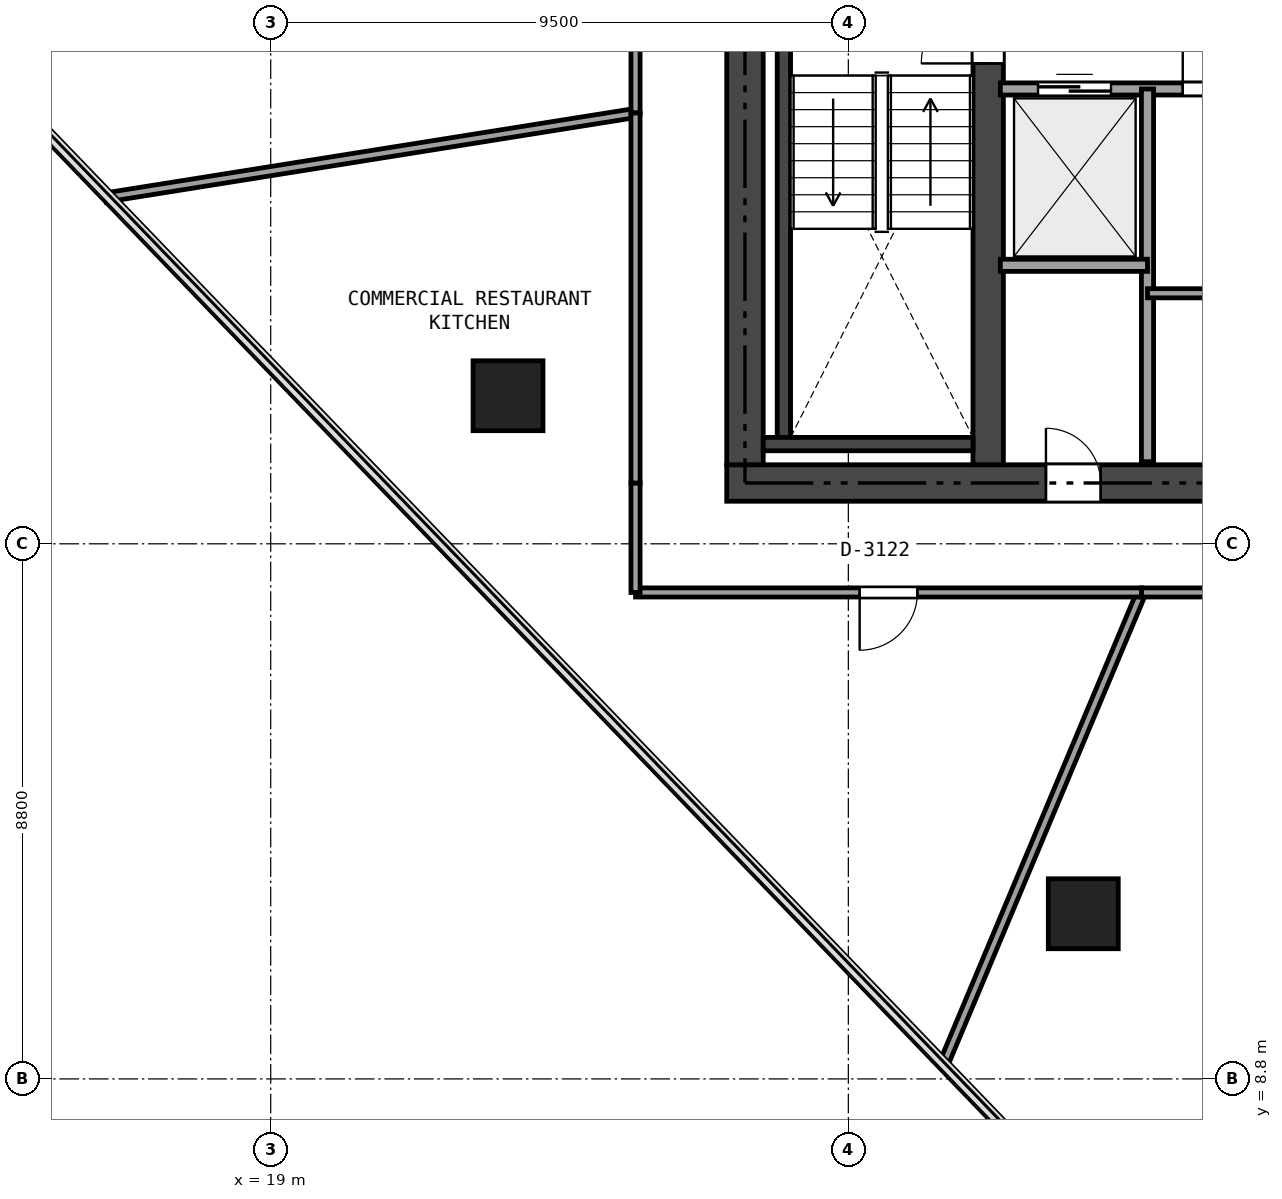
"""IFC4 building model, lengths in metres.
Left out: names, types, materials, properties, quantities, classifications, styles, units other than length and angle.
Written with IfcOpenShell. Run it as: python <this file> out.ifc"""

import sys

from ifc_helpers import new_model, si_unit, direction, frame, frame_2d, origin, origin_2d, place, context, subcontext, project, spatial, rectangle, extrude, element, fill, save


model = new_model("IFC4")
c1 = context("Model", 3, precision=1e-05, world=origin(), true_north=direction((0.0, 1.0)))
c2 = subcontext(c1, "Body", "Model", "MODEL_VIEW")
j1 = project(units=[si_unit("LENGTHUNIT", "METRE"), si_unit("PLANEANGLEUNIT", "RADIAN")], contexts=[c1])
p1 = place(None, origin())
s1 = spatial("IfcSite", under=j1, at=p1, CompositionType="ELEMENT")
p2 = place(p1, origin())
s2 = spatial("IfcBuilding", under=s1, at=p2, CompositionType="ELEMENT")
p3 = place(p2, frame((0.0, 0.0, 117.75)))
s3 = spatial("IfcBuildingStorey", under=s2, at=p3, CompositionType="ELEMENT", Elevation=117.75)
p4 = place(p3, frame((26.5, 18.6, 0.0), z_axis=(0.0, 0.0, 1.0), x_axis=(1.0, 0.0, 0.0)))
e1 = element("IfcWall", 1, at=p4, inside=s3, PredefinedType="SHEAR", context=c2, shape_type="SweptSolid", body=[
    extrude(rectangle(XDim=21.4, YDim=0.6, at=frame_2d((10.7, 0.0))), origin(), (0.0, 0.0, 1.0), 3.09),
])
p5 = place(p4, frame((12.425, 0.0, 0.0)))
e2 = element("IfcOpeningElement", 2, at=p5, cuts=e1, PredefinedType="OPENING", context=c2, shape_type="SweptSolid", body=[
    extrude(rectangle(XDim=1.15, YDim=2.15, at=frame_2d((0.575, 1.075))), frame((0.0, 0.31, 0.0), z_axis=(0.0, -1.0, 0.0), x_axis=(1.0, 0.0, 0.0)), (0.0, 0.0, 1.0), 0.62),
])
p6 = place(p4, frame((5.25, 0.0, 0.0)))
e3 = element("IfcOpeningElement", 3, at=p6, cuts=e1, PredefinedType="OPENING", context=c2, shape_type="SweptSolid", body=[
    extrude(rectangle(XDim=0.9, YDim=2.1, at=frame_2d((0.45, 1.05))), frame((0.0, 0.31, 0.0), z_axis=(0.0, -1.0, 0.0), x_axis=(1.0, 0.0, 0.0)), (0.0, 0.0, 1.0), 0.62),
])
p7 = place(p3, frame((26.8, 18.9, 0.0), z_axis=(0.0, 0.0, 1.0), x_axis=(0.0, 1.0, 0.0)))
e4 = element("IfcWall", 4, at=p7, inside=s3, PredefinedType="SHEAR", context=c2, shape_type="SweptSolid", body=[
    extrude(rectangle(XDim=15.0, YDim=0.6, at=frame_2d((7.5, 0.0))), origin(), (0.0, 0.0, 1.0), 3.09),
])
p8 = place(p3, frame((30.8, 18.9, 0.0), z_axis=(0.0, 0.0, 1.0), x_axis=(0.0, 1.0, 0.0)))
e5 = element("IfcWall", 5, at=p8, inside=s3, PredefinedType="SHEAR", context=c2, shape_type="SweptSolid", body=[
    extrude(rectangle(XDim=15.0, YDim=0.5, at=frame_2d((7.5, 0.0))), origin(), (0.0, 0.0, 1.0), 3.09),
])
p9 = place(p8, frame((6.6, 0.0, 0.0)))
e6 = element("IfcOpeningElement", 6, at=p9, cuts=e5, PredefinedType="OPENING", context=c2, shape_type="SweptSolid", body=[
    extrude(rectangle(XDim=1.1, YDim=2.15, at=frame_2d((0.55, 1.075))), frame((0.0, 0.26, 0.0), z_axis=(0.0, -1.0, 0.0), x_axis=(1.0, 0.0, 0.0)), (0.0, 0.0, 1.0), 0.52),
])
p10 = place(p8, frame((8.4, 0.0, 0.0)))
e7 = element("IfcOpeningElement", 7, at=p10, cuts=e5, PredefinedType="OPENING", context=c2, shape_type="SweptSolid", body=[
    extrude(rectangle(XDim=0.9, YDim=2.1, at=frame_2d((0.45, 1.05))), frame((0.0, 0.26, 0.0), z_axis=(0.0, -1.0, 0.0), x_axis=(1.0, 0.0, 0.0)), (0.0, 0.0, 1.0), 0.52),
])
p11 = place(p3, frame((27.44, 19.35, 0.0), z_axis=(0.0, 0.0, 1.0), x_axis=(0.0, 1.0, 0.0)))
e8 = element("IfcWall", 8, at=p11, inside=s3, PredefinedType="SHEAR", context=c2, shape_type="SweptSolid", body=[
    extrude(rectangle(XDim=7.4, YDim=0.22, at=frame_2d((3.7, 0.0))), origin(), (0.0, 0.0, 1.0), 3.09),
])
p12 = place(p3, frame((27.1, 19.24, 0.0), z_axis=(0.0, 0.0, 1.0), x_axis=(1.0, 0.0, 0.0)))
e9 = element("IfcWall", 9, at=p12, inside=s3, PredefinedType="SHEAR", context=c2, shape_type="SweptSolid", body=[
    extrude(rectangle(XDim=3.45, YDim=0.22, at=frame_2d((1.725, 0.0))), origin(), (0.0, 0.0, 1.0), 3.09),
])
for number, where, z_axis, x_axis in (
    (10, (22.903, 20.035, 0.0), (0.0, 0.0, 1.0), (1.0, 0.0, 0.0)),
    (11, (32.364, 11.516, 0.0), (0.0, 0.0, 1.0), (1.0, 0.0, 0.0)),
):
    element("IfcColumn", number, at=place(p3, frame(where, z_axis=z_axis, x_axis=x_axis)), inside=s3, PredefinedType="COLUMN", context=c2, shape_type="SweptSolid", body=[
        extrude(rectangle(XDim=1.15, YDim=1.15, at=origin_2d()), origin(), (0.0, 0.0, 1.0), 3.09),
    ])
p13 = place(p3, frame((31.0, 25.08, 0.0), z_axis=(0.0, 0.0, 1.0), x_axis=(1.0, 0.0, 0.0)))
e12 = element("IfcWall", 12, at=p13, inside=s3, PredefinedType="SOLIDWALL", context=c2, shape_type="SweptSolid", body=[
    extrude(rectangle(XDim=4.42, YDim=0.2, at=frame_2d((2.21, 0.0))), origin(), (0.0, 0.0, 1.0), 3.09),
])
p14 = place(p13, frame((3.0, 0.0, 0.0)))
e13 = element("IfcOpeningElement", 13, at=p14, cuts=e12, PredefinedType="OPENING", context=c2, shape_type="SweptSolid", body=[
    extrude(rectangle(XDim=0.9, YDim=2.1, at=frame_2d((0.45, 1.05))), frame((0.0, 0.11, 0.0), z_axis=(0.0, -1.0, 0.0), x_axis=(1.0, 0.0, 0.0)), (0.0, 0.0, 1.0), 0.22),
])
p15 = place(p13, frame((0.62, 0.0, 0.0)))
e14 = element("IfcOpeningElement", 14, at=p15, cuts=e12, PredefinedType="OPENING", context=c2, shape_type="SweptSolid", body=[
    extrude(rectangle(XDim=1.2, YDim=2.15, at=frame_2d((0.6, 1.075))), frame((0.0, 0.11, 0.0), z_axis=(0.0, -1.0, 0.0), x_axis=(1.0, 0.0, 0.0)), (0.0, 0.0, 1.0), 0.22),
])
p16 = place(p3, frame((33.42, 18.95, 0.0), z_axis=(0.0, 0.0, 1.0), x_axis=(0.0, 1.0, 0.0)))
e15 = element("IfcWall", 15, at=p16, inside=s3, PredefinedType="SOLIDWALL", context=c2, shape_type="SweptSolid", body=[
    extrude(rectangle(XDim=6.13, YDim=0.2, at=frame_2d((3.065, 0.0))), origin(), (0.0, 0.0, 1.0), 2.611),
])
p17 = place(p3, frame((31.0, 22.18, 0.0), z_axis=(0.0, 0.0, 1.0), x_axis=(1.0, 0.0, 0.0)))
e16 = element("IfcWall", 16, at=p17, inside=s3, PredefinedType="SOLIDWALL", context=c2, shape_type="SweptSolid", body=[
    extrude(rectangle(XDim=2.42, YDim=0.2, at=frame_2d((1.21, 0.0))), origin(), (0.0, 0.0, 1.0), 3.09),
])
p18 = place(p3, frame((33.42, 21.72, 0.0), z_axis=(0.0, 0.0, 1.0), x_axis=(1.0, 0.0, 0.0)))
e17 = element("IfcWall", 17, at=p18, inside=s3, PredefinedType="PARTITIONING", context=c2, shape_type="SweptSolid", body=[
    extrude(rectangle(XDim=2.0, YDim=0.15, at=frame_2d((1.0, 0.0))), origin(), (0.0, 0.0, 1.0), 3.09),
])
p19 = place(p3, frame((16.281, 23.295, 0.0), z_axis=(0.0, 0.0, 1.0), x_axis=(0.987527105535, 0.157449089657, 0.0)))
e18 = element("IfcWall", 18, at=p19, inside=s3, PredefinedType="PARTITIONING", context=c2, shape_type="SweptSolid", body=[
    extrude(rectangle(XDim=8.829, YDim=0.15, at=frame_2d((4.415, 0.0))), origin(), (0.0, 0.0, 1.0), 2.375),
])
p20 = place(p3, frame((25.0, 24.685, 0.0), z_axis=(0.0, 0.0, 1.0), x_axis=(0.0, 1.0, 0.0)))
e19 = element("IfcWall", 19, at=p20, inside=s3, PredefinedType="PARTITIONING", context=c2, shape_type="SweptSolid", body=[
    extrude(rectangle(XDim=11.315, YDim=0.15, at=frame_2d((5.657, 0.0))), origin(), (0.0, 0.0, 1.0), 2.375),
])
p21 = place(p20, frame((5.183, 0.0, 0.0)))
e20 = element("IfcOpeningElement", 20, at=p21, cuts=e19, PredefinedType="OPENING", context=c2, shape_type="SweptSolid", body=[
    extrude(rectangle(XDim=0.95, YDim=2.15, at=frame_2d((0.475, 1.075))), frame((0.0, 0.085, 0.0), z_axis=(0.0, -1.0, 0.0), x_axis=(1.0, 0.0, 0.0)), (0.0, 0.0, 1.0), 0.17),
])
p22 = place(p3, frame((30.051, 9.008, 0.0), z_axis=(0.0, 0.0, 1.0), x_axis=(0.386969195842, 0.922092642563, 0.0)))
e21 = element("IfcWall", 21, at=p22, inside=s3, PredefinedType="PARTITIONING", context=c2, shape_type="SweptSolid", body=[
    extrude(rectangle(XDim=8.45, YDim=0.15, at=frame_2d((4.225, 0.0))), origin(), (0.0, 0.0, 1.0), 2.375),
])
p23 = place(p3, frame((33.321, 16.8, 0.0), z_axis=(0.0, 0.0, 1.0), x_axis=(-1.0, 0.0, 0.0)))
e22 = element("IfcWall", 22, at=p23, inside=s3, PredefinedType="PARTITIONING", context=c2, shape_type="SweptSolid", body=[
    extrude(rectangle(XDim=8.321, YDim=0.15, at=frame_2d((4.161, 0.0))), origin(), (0.0, 0.0, 1.0), 2.375),
])
p24 = place(p23, frame((3.685, 0.0, 0.0)))
e23 = element("IfcOpeningElement", 23, at=p24, cuts=e22, PredefinedType="OPENING", context=c2, shape_type="SweptSolid", body=[
    extrude(rectangle(XDim=0.95, YDim=2.15, at=frame_2d((0.475, 1.075))), frame((0.0, 0.085, 0.0), z_axis=(0.0, -1.0, 0.0), x_axis=(1.0, 0.0, 0.0)), (0.0, 0.0, 1.0), 0.17),
])
p25 = place(p3, frame((25.0, 16.8, 0.0), z_axis=(0.0, 0.0, 1.0), x_axis=(0.0, 1.0, 0.0)))
e24 = element("IfcWall", 24, at=p25, inside=s3, PredefinedType="PARTITIONING", context=c2, shape_type="SweptSolid", body=[
    extrude(rectangle(XDim=1.8, YDim=0.15, at=frame_2d((0.9, 0.0))), origin(), (0.0, 0.0, 1.0), 2.375),
])
p26 = place(p3, frame((25.0, 18.6, 0.0), z_axis=(0.0, 0.0, 1.0), x_axis=(0.0, 1.0, 0.0)))
e25 = element("IfcWall", 25, at=p26, inside=s3, PredefinedType="PARTITIONING", context=c2, shape_type="SweptSolid", body=[
    extrude(rectangle(XDim=6.085, YDim=0.15, at=frame_2d((3.042, 0.0))), origin(), (0.0, 0.0, 1.0), 2.387),
])
p27 = place(p3, frame((44.7, 16.8, 0.0), z_axis=(0.0, 0.0, 1.0), x_axis=(-1.0, 0.0, 0.0)))
e26 = element("IfcWall", 26, at=p27, inside=s3, PredefinedType="PARTITIONING", context=c2, shape_type="SweptSolid", body=[
    extrude(rectangle(XDim=11.379, YDim=0.15, at=frame_2d((5.689, 0.0))), origin(), (0.0, 0.0, 1.0), 2.387),
])
p28 = place(p27, frame((4.79, 0.0, 0.0)))
e27 = element("IfcOpeningElement", 27, at=p28, cuts=e26, PredefinedType="OPENING", context=c2, shape_type="SweptSolid", body=[
    extrude(rectangle(XDim=1.8, YDim=2.25, at=frame_2d((0.9, 1.125))), frame((0.0, 0.085, 0.0), z_axis=(0.0, -1.0, 0.0), x_axis=(1.0, 0.0, 0.0)), (0.0, 0.0, 1.0), 0.17),
])
p29 = place(p9, origin())
e28 = element("IfcDoor", 28, at=p29, inside=s3, OperationType="SINGLE_SWING_LEFT", PredefinedType="DOOR", context=c2, shape_type="SweptSolid", body=[
    extrude(rectangle(XDim=1.1, YDim=2.15, at=frame_2d((0.55, 1.075))), frame((0.0, 0.025, 0.0), z_axis=(0.0, -1.0, 0.0), x_axis=(1.0, 0.0, 0.0)), (0.0, 0.0, 1.0), 0.05),
])
fill(e6, e28)
p30 = place(p6, origin())
e29 = element("IfcDoor", 29, at=p30, inside=s3, OperationType="SINGLE_SWING_LEFT", PredefinedType="DOOR", context=c2, shape_type="SweptSolid", body=[
    extrude(rectangle(XDim=0.9, YDim=2.1, at=frame_2d((0.45, 1.05))), frame((0.0, 0.025, 0.0), z_axis=(0.0, -1.0, 0.0), x_axis=(1.0, 0.0, 0.0)), (0.0, 0.0, 1.0), 0.05),
])
fill(e3, e29)
p31 = place(p14, origin())
e30 = element("IfcDoor", 30, at=p31, inside=s3, OperationType="SINGLE_SWING_LEFT", PredefinedType="DOOR", context=c2, shape_type="SweptSolid", body=[
    extrude(rectangle(XDim=0.9, YDim=2.1, at=frame_2d((0.45, 1.05))), frame((0.0, 0.025, 0.0), z_axis=(0.0, -1.0, 0.0), x_axis=(1.0, 0.0, 0.0)), (0.0, 0.0, 1.0), 0.05),
])
fill(e13, e30)
p32 = place(p15, origin())
e31 = element("IfcDoor", 31, at=p32, inside=s3, OperationType="SLIDING_TO_LEFT", PredefinedType="DOOR", context=c2, shape_type="SweptSolid", body=[
    extrude(rectangle(XDim=1.2, YDim=2.15, at=frame_2d((0.6, 1.075))), frame((0.0, 0.025, 0.0), z_axis=(0.0, -1.0, 0.0), x_axis=(1.0, 0.0, 0.0)), (0.0, 0.0, 1.0), 0.05),
])
fill(e14, e31)
p33 = place(p24, origin())
e32 = element("IfcDoor", 32, at=p33, inside=s3, OperationType="SINGLE_SWING_RIGHT", PredefinedType="DOOR", context=c2, shape_type="SweptSolid", body=[
    extrude(rectangle(XDim=0.95, YDim=2.15, at=frame_2d((0.475, 1.075))), frame((0.0, 0.025, 0.0), z_axis=(0.0, -1.0, 0.0), x_axis=(1.0, 0.0, 0.0)), (0.0, 0.0, 1.0), 0.05),
])
fill(e23, e32)
save(model, sys.argv[1])
